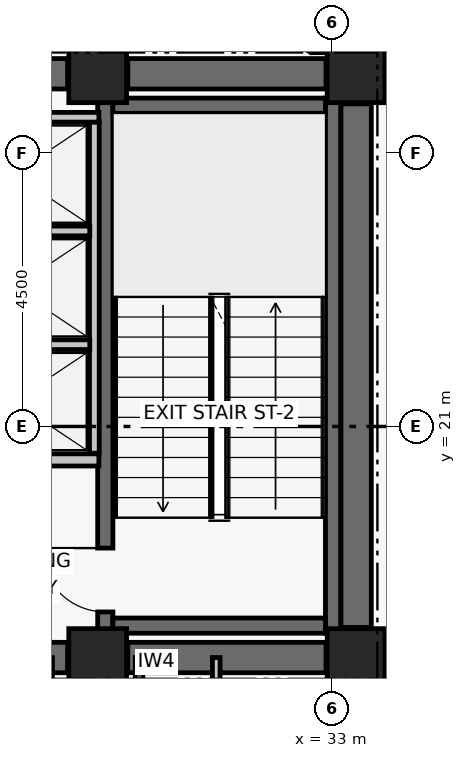
"""IFC4 building model, lengths in metres.
Left out: names, types, materials, properties, quantities, classifications, styles, units other than length and angle.
Written with IfcOpenShell. Run it as: python <this file> out.ifc"""

import sys

from ifc_helpers import new_model, si_unit, direction, frame, frame_2d, origin, origin_2d, place, context, subcontext, project, spatial, rectangle, extrude, element, fill, save


model = new_model("IFC4")
c1 = context("Model", 3, precision=1e-05, world=origin(), true_north=direction((0.0, 1.0)))
c2 = subcontext(c1, "Body", "Model", "MODEL_VIEW")
j1 = project(units=[si_unit("LENGTHUNIT", "METRE"), si_unit("PLANEANGLEUNIT", "RADIAN")], contexts=[c1])
p1 = place(None, origin())
s1 = spatial("IfcSite", under=j1, at=p1, CompositionType="ELEMENT")
p2 = place(p1, origin())
s2 = spatial("IfcBuilding", under=s1, at=p2, CompositionType="ELEMENT")
p3 = place(p2, frame((0.0, 0.0, 187.8)))
s3 = spatial("IfcBuildingStorey", under=s2, at=p3, CompositionType="ELEMENT", Elevation=187.8)
for number, where, z_axis, x_axis in (
    (1, (29.15, 17.2, 0.0), (0.0, 0.0, 1.0), (1.0, 0.0, 0.0)),
    (2, (33.4, 17.2, 0.0), (0.0, 0.0, 1.0), (1.0, 0.0, 0.0)),
    (3, (29.15, 26.8, 0.0), (0.0, 0.0, 1.0), (1.0, 0.0, 0.0)),
    (4, (33.4, 26.8, 0.0), (0.0, 0.0, 1.0), (1.0, 0.0, 0.0)),
):
    element("IfcColumn", number, at=place(p3, frame(where, z_axis=z_axis, x_axis=x_axis)), inside=s3, PredefinedType="COLUMN", context=c2, shape_type="SweptSolid", body=[
        extrude(rectangle(XDim=0.95, YDim=0.95, at=origin_2d()), origin(), (0.0, 0.0, 1.0), 3.72),
    ])
p4 = place(p3, frame((26.85, 17.2, 0.0), z_axis=(0.0, 0.0, 1.0), x_axis=(1.0, 0.0, 0.0)))
e5 = element("IfcWall", 5, at=p4, inside=s3, PredefinedType="SHEAR", context=c2, shape_type="SweptSolid", body=[
    extrude(rectangle(XDim=1.805, YDim=0.5, at=frame_2d((0.902, 0.0))), origin(), (0.0, 0.0, 1.0), 3.5),
])
p5 = place(p3, frame((29.645, 17.2, 0.0), z_axis=(0.0, 0.0, 1.0), x_axis=(1.0, 0.0, 0.0)))
e6 = element("IfcWall", 6, at=p5, inside=s3, PredefinedType="SHEAR", context=c2, shape_type="SweptSolid", body=[
    extrude(rectangle(XDim=3.26, YDim=0.5, at=frame_2d((1.63, 0.0))), origin(), (0.0, 0.0, 1.0), 3.5),
])
p6 = place(p3, frame((26.85, 26.8, 0.0), z_axis=(0.0, 0.0, 1.0), x_axis=(1.0, 0.0, 0.0)))
e7 = element("IfcWall", 7, at=p6, inside=s3, PredefinedType="SHEAR", context=c2, shape_type="SweptSolid", body=[
    extrude(rectangle(XDim=1.805, YDim=0.5, at=frame_2d((0.902, 0.0))), origin(), (0.0, 0.0, 1.0), 3.5),
])
p7 = place(p3, frame((29.645, 26.8, 0.0), z_axis=(0.0, 0.0, 1.0), x_axis=(1.0, 0.0, 0.0)))
e8 = element("IfcWall", 8, at=p7, inside=s3, PredefinedType="SHEAR", context=c2, shape_type="SweptSolid", body=[
    extrude(rectangle(XDim=3.26, YDim=0.5, at=frame_2d((1.63, 0.0))), origin(), (0.0, 0.0, 1.0), 3.5),
])
p8 = place(p3, frame((33.4, 17.695, 0.0), z_axis=(0.0, 0.0, 1.0), x_axis=(0.0, 1.0, 0.0)))
e9 = element("IfcWall", 9, at=p8, inside=s3, PredefinedType="SHEAR", context=c2, shape_type="SweptSolid", body=[
    extrude(rectangle(XDim=8.61, YDim=0.5, at=frame_2d((4.305, 0.0))), origin(), (0.0, 0.0, 1.0), 3.5),
])
p9 = place(p3, frame((29.275, 17.6, 0.0), z_axis=(0.0, 0.0, 1.0), x_axis=(0.0, 1.0, 0.0)))
e10 = element("IfcWall", 10, at=p9, inside=s3, PredefinedType="SHEAR", context=c2, shape_type="SweptSolid", body=[
    extrude(rectangle(XDim=8.8, YDim=0.25, at=frame_2d((4.4, 0.0))), origin(), (0.0, 0.0, 1.0), 3.5),
])
p10 = place(p9, frame((0.35, 0.0, 0.0)))
e11 = element("IfcOpeningElement", 11, at=p10, cuts=e10, PredefinedType="OPENING", context=c2, shape_type="SweptSolid", body=[
    extrude(rectangle(XDim=1.05, YDim=2.08, at=frame_2d((0.525, 1.04))), frame((0.0, 0.135, 0.0), z_axis=(0.0, -1.0, 0.0), x_axis=(1.0, 0.0, 0.0)), (0.0, 0.0, 1.0), 0.27),
])
p11 = place(p3, frame((33.021, 17.6, 0.0), z_axis=(0.0, 0.0, 1.0), x_axis=(0.0, 1.0, 0.0)))
e12 = element("IfcWall", 12, at=p11, inside=s3, PredefinedType="SHEAR", context=c2, shape_type="SweptSolid", body=[
    extrude(rectangle(XDim=8.8, YDim=0.25, at=frame_2d((4.4, 0.0))), origin(), (0.0, 0.0, 1.0), 3.5),
])
for number, where, z_axis, x_axis in (
    (13, (29.4, 17.725, 0.0), (0.0, 0.0, 1.0), (1.0, 0.0, 0.0)),
    (14, (29.4, 26.275, 0.0), (0.0, 0.0, 1.0), (1.0, 0.0, 0.0)),
):
    element("IfcWall", number, at=place(p3, frame(where, z_axis=z_axis, x_axis=x_axis)), inside=s3, PredefinedType="SHEAR", context=c2, shape_type="SweptSolid", body=[
        extrude(rectangle(XDim=3.496, YDim=0.25, at=frame_2d((1.748, 0.0))), origin(), (0.0, 0.0, 1.0), 3.5),
    ])
p12 = place(p3, frame((26.37, 20.45, 0.0), z_axis=(0.0, 0.0, 1.0), x_axis=(1.0, 0.0, 0.0)))
e15 = element("IfcWall", 15, at=p12, inside=s3, PredefinedType="PARTITIONING", context=c2, shape_type="SweptSolid", body=[
    extrude(rectangle(XDim=2.8, YDim=0.2, at=frame_2d((1.4, 0.0))), origin(), (0.0, 0.0, 1.0), 3.5),
])
p13 = place(p12, frame((0.78, 0.0, 0.0)))
e16 = element("IfcOpeningElement", 16, at=p13, cuts=e15, PredefinedType="OPENING", context=c2, shape_type="SweptSolid", body=[
    extrude(rectangle(XDim=1.1, YDim=2.08, at=frame_2d((0.55, 1.04))), frame((0.0, 0.11, 0.0), z_axis=(0.0, -1.0, 0.0), x_axis=(1.0, 0.0, 0.0)), (0.0, 0.0, 1.0), 0.22),
])
p14 = place(p3, frame((29.095, 20.56, 0.0), z_axis=(0.0, 0.0, 1.0), x_axis=(0.0, 1.0, 0.0)))
e17 = element("IfcWall", 17, at=p14, inside=s3, PredefinedType="PARTITIONING", context=c2, shape_type="SweptSolid", body=[
    extrude(rectangle(XDim=5.45, YDim=0.16, at=frame_2d((2.725, 0.0))), origin(), (0.0, 0.0, 1.0), 3.5),
])
p15 = place(p3, frame((26.37, 22.345, 0.0), z_axis=(0.0, 0.0, 1.0), x_axis=(1.0, 0.0, 0.0)))
e18 = element("IfcWall", 18, at=p15, inside=s3, PredefinedType="PARTITIONING", context=c2, shape_type="SweptSolid", body=[
    extrude(rectangle(XDim=2.65, YDim=0.16, at=frame_2d((1.325, 0.0))), origin(), (0.0, 0.0, 1.0), 3.5),
])
p16 = place(p3, frame((26.53, 24.215, 0.0), z_axis=(0.0, 0.0, 1.0), x_axis=(1.0, 0.0, 0.0)))
e19 = element("IfcWall", 19, at=p16, inside=s3, PredefinedType="PARTITIONING", context=c2, shape_type="SweptSolid", body=[
    extrude(rectangle(XDim=2.49, YDim=0.16, at=frame_2d((1.245, 0.0))), origin(), (0.0, 0.0, 1.0), 3.5),
])
p17 = place(p3, frame((26.34, 26.085, 0.0), z_axis=(0.0, 0.0, 1.0), x_axis=(1.0, 0.0, 0.0)))
e20 = element("IfcWall", 20, at=p17, inside=s3, PredefinedType="PARTITIONING", context=c2, shape_type="SweptSolid", body=[
    extrude(rectangle(XDim=2.83, YDim=0.16, at=frame_2d((1.415, 0.0))), origin(), (0.0, 0.0, 1.0), 3.5),
])
p18 = place(p3, frame((28.35, 14.95, 0.0), z_axis=(0.0, 0.0, 1.0), x_axis=(0.0, 1.0, 0.0)))
e21 = element("IfcWall", 21, at=p18, inside=s3, PredefinedType="PARTITIONING", context=c2, shape_type="SweptSolid", body=[
    extrude(rectangle(XDim=2.25, YDim=0.11, at=frame_2d((1.125, 0.0))), origin(), (0.0, 0.0, 1.0), 2.63),
])
for number, where, z_axis, x_axis in (
    (22, (29.83, 14.95, 0.0), (0.0, 0.0, 1.0), (0.0, 1.0, 0.0)),
    (23, (31.1, 14.95, 0.0), (0.0, 0.0, 1.0), (0.0, 1.0, 0.0)),
):
    element("IfcWall", number, at=place(p3, frame(where, z_axis=z_axis, x_axis=x_axis)), inside=s3, PredefinedType="PARTITIONING", context=c2, shape_type="SweptSolid", body=[
        extrude(rectangle(XDim=2.25, YDim=0.125, at=frame_2d((1.125, 0.0))), origin(), (0.0, 0.0, 1.0), 2.63),
    ])
p19 = place(p3, frame((33.74, 27.22, 0.0), z_axis=(0.0, 0.0, 1.0), x_axis=(-1.0, 0.0, 0.0)))
e24 = element("IfcWall", 24, at=p19, inside=s3, PredefinedType="PARTITIONING", context=c2, shape_type="SweptSolid", body=[
    extrude(rectangle(XDim=1.062, YDim=0.145, at=frame_2d((0.531, 0.0))), origin(), (0.0, 0.0, 1.0), 2.63),
])
p20 = place(p10, origin())
e25 = element("IfcDoor", 25, at=p20, inside=s3, OperationType="SINGLE_SWING_RIGHT", PredefinedType="DOOR", context=c2, shape_type="SweptSolid", body=[
    extrude(rectangle(XDim=1.05, YDim=2.08, at=frame_2d((0.525, 1.04))), frame((0.0, 0.025, 0.0), z_axis=(0.0, -1.0, 0.0), x_axis=(1.0, 0.0, 0.0)), (0.0, 0.0, 1.0), 0.05),
])
fill(e11, e25)
save(model, sys.argv[1])
